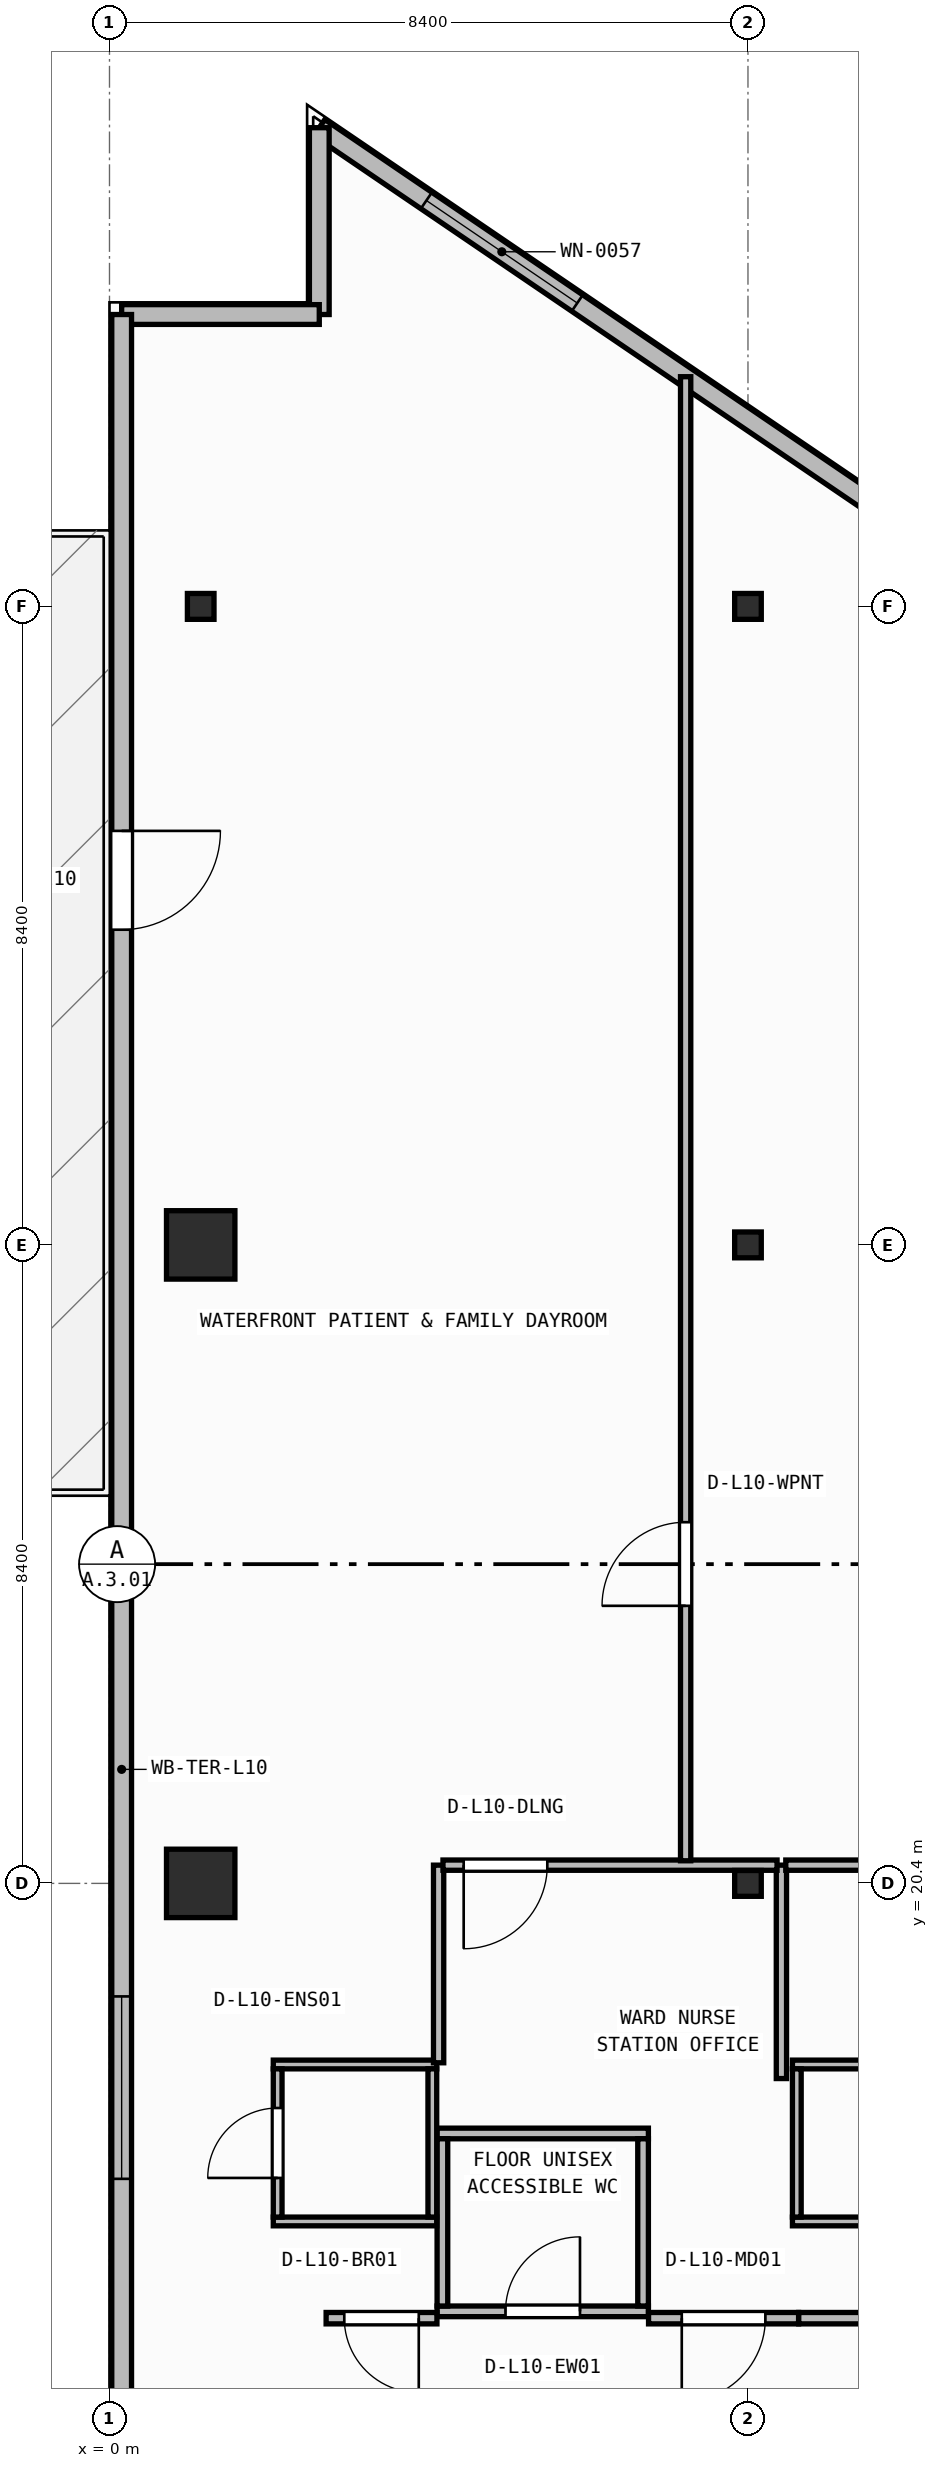
"""IFC4 building model, lengths in metres.
Left out: names, types, materials, properties, quantities, classifications, styles, units other than length and angle.
Written with IfcOpenShell. Run it as: python <this file> out.ifc"""

import sys

from ifc_helpers import new_model, si_unit, direction, frame, frame_2d, origin, origin_2d, place, context, subcontext, project, spatial, rectangle, i_section, extrude, element, fill, save


model = new_model("IFC4")
c1 = context("Model", 3, precision=1e-05, world=origin(), true_north=direction((0.0, 1.0)))
c2 = subcontext(c1, "Body", "Model", "MODEL_VIEW")
j1 = project(units=[si_unit("LENGTHUNIT", "METRE"), si_unit("PLANEANGLEUNIT", "RADIAN")], contexts=[c1])
p1 = place(None, origin())
s1 = spatial("IfcSite", under=j1, at=p1, CompositionType="ELEMENT")
p2 = place(p1, origin())
s2 = spatial("IfcBuilding", under=s1, at=p2, CompositionType="ELEMENT")
p3 = place(p2, frame((0.0, 0.0, 42.25)))
s3 = spatial("IfcBuildingStorey", under=s2, at=p3, CompositionType="ELEMENT", Elevation=42.25)
p4 = place(p3, frame((1.2, 20.4, 0.0), z_axis=(0.0, 0.0, 1.0), x_axis=(1.0, 0.0, 0.0)))
e1 = element("IfcColumn", 1, at=p4, inside=s3, PredefinedType="COLUMN", context=c2, shape_type="SweptSolid", body=[
    extrude(rectangle(XDim=0.9, YDim=0.9, at=origin_2d()), origin(), (0.0, 0.0, 1.0), 3.95),
])
p5 = place(p3, frame((8.4, 20.4, 0.0), z_axis=(0.0, 0.0, 1.0), x_axis=(1.0, 0.0, 0.0)))
e2 = element("IfcColumn", 2, at=p5, inside=s3, PredefinedType="COLUMN", context=c2, shape_type="SweptSolid", body=[
    extrude(i_section(OverallWidth=0.35, OverallDepth=0.34, WebThickness=0.016, FlangeThickness=0.028, at=origin_2d()), origin(), (0.0, 0.0, 1.0), 3.95),
])
p6 = place(p3, frame((1.2, 28.8, 0.0), z_axis=(0.0, 0.0, 1.0), x_axis=(1.0, 0.0, 0.0)))
e3 = element("IfcColumn", 3, at=p6, inside=s3, PredefinedType="COLUMN", context=c2, shape_type="SweptSolid", body=[
    extrude(rectangle(XDim=0.9, YDim=0.9, at=origin_2d()), origin(), (0.0, 0.0, 1.0), 3.95),
])
for number, where, z_axis, x_axis in (
    (4, (8.4, 28.8, 0.0), (0.0, 0.0, 1.0), (1.0, 0.0, 0.0)),
    (5, (1.2, 37.2, 0.0), (0.0, 0.0, 1.0), (1.0, 0.0, 0.0)),
    (6, (8.4, 37.2, 0.0), (0.0, 0.0, 1.0), (1.0, 0.0, 0.0)),
):
    element("IfcColumn", number, at=place(p3, frame(where, z_axis=z_axis, x_axis=x_axis)), inside=s3, PredefinedType="COLUMN", context=c2, shape_type="SweptSolid", body=[
        extrude(i_section(OverallWidth=0.35, OverallDepth=0.34, WebThickness=0.016, FlangeThickness=0.028, at=origin_2d()), origin(), (0.0, 0.0, 1.0), 3.95),
    ])
p7 = place(p3, frame((11.561, 37.517, 0.0), z_axis=(0.0, 0.0, 1.0), x_axis=(-0.827064743936, 0.562106670782, 0.0)))
e7 = element("IfcWall", 7, at=p7, inside=s3, PredefinedType="STANDARD", context=c2, shape_type="SweptSolid", body=[
    extrude(rectangle(XDim=10.641, YDim=0.26, at=frame_2d((5.32, 0.0))), origin(), (0.0, 0.0, 1.0), 3.71),
])
p8 = place(p7, frame((6.537, 0.0, 0.9)))
e8 = element("IfcOpeningElement", 8, at=p8, cuts=e7, PredefinedType="OPENING", context=c2, shape_type="SweptSolid", body=[
    extrude(rectangle(XDim=2.4, YDim=1.65, at=frame_2d((1.2, 0.825))), frame((0.0, 0.14, 0.0), z_axis=(0.0, -1.0, 0.0), x_axis=(1.0, 0.0, 0.0)), (0.0, 0.0, 1.0), 0.28),
])
p9 = place(p3, frame((2.76, 43.498, 0.0), z_axis=(0.0, 0.0, 1.0), x_axis=(0.0, -1.0, 0.0)))
e9 = element("IfcWall", 9, at=p9, inside=s3, PredefinedType="STANDARD", context=c2, shape_type="SweptSolid", body=[
    extrude(rectangle(XDim=2.458, YDim=0.26, at=frame_2d((1.229, 0.0))), origin(), (0.0, 0.0, 1.0), 3.71),
])
p10 = place(p3, frame((2.76, 41.04, 0.0), z_axis=(0.0, 0.0, 1.0), x_axis=(-1.0, 0.0, 0.0)))
e10 = element("IfcWall", 10, at=p10, inside=s3, PredefinedType="STANDARD", context=c2, shape_type="SweptSolid", body=[
    extrude(rectangle(XDim=2.6, YDim=0.26, at=frame_2d((1.3, 0.0))), origin(), (0.0, 0.0, 1.0), 3.71),
])
p11 = place(p3, frame((0.16, 41.04, 0.0), z_axis=(0.0, 0.0, 1.0), x_axis=(0.0, -1.0, 0.0)))
e11 = element("IfcWall", 11, at=p11, inside=s3, PredefinedType="STANDARD", context=c2, shape_type="SweptSolid", body=[
    extrude(rectangle(XDim=38.28, YDim=0.26, at=frame_2d((19.14, 0.0))), origin(), (0.0, 0.0, 1.0), 3.71),
])
p12 = place(p11, frame((6.793, 0.0, 0.0)))
e12 = element("IfcOpeningElement", 12, at=p12, cuts=e11, PredefinedType="OPENING", context=c2, shape_type="SweptSolid", body=[
    extrude(rectangle(XDim=1.3, YDim=2.15, at=frame_2d((0.65, 1.075))), frame((0.0, 0.14, 0.0), z_axis=(0.0, -1.0, 0.0), x_axis=(1.0, 0.0, 0.0)), (0.0, 0.0, 1.0), 0.28),
])
p13 = place(p11, frame((22.127, 0.0, 0.9)))
e13 = element("IfcOpeningElement", 13, at=p13, cuts=e11, PredefinedType="OPENING", context=c2, shape_type="SweptSolid", body=[
    extrude(rectangle(XDim=2.4, YDim=1.65, at=frame_2d((1.2, 0.825))), frame((0.0, 0.14, 0.0), z_axis=(0.0, -1.0, 0.0), x_axis=(1.0, 0.0, 0.0)), (0.0, 0.0, 1.0), 0.28),
])
p14 = place(p3, frame((4.31, 14.77, 0.0), z_axis=(0.0, 0.0, 1.0), x_axis=(1.0, 0.0, 0.0)))
e14 = element("IfcWall", 14, at=p14, inside=s3, PredefinedType="PARTITIONING", context=c2, shape_type="SweptSolid", body=[
    extrude(rectangle(XDim=2.78, YDim=0.14, at=frame_2d((1.39, 0.0))), origin(), (0.0, 0.0, 1.0), 3.71),
])
p15 = place(p14, frame((0.9, 0.0, 0.0)))
e15 = element("IfcOpeningElement", 15, at=p15, cuts=e14, PredefinedType="OPENING", context=c2, shape_type="SweptSolid", body=[
    extrude(rectangle(XDim=0.98, YDim=2.1, at=frame_2d((0.49, 1.05))), frame((0.0, 0.08, 0.0), z_axis=(0.0, -1.0, 0.0), x_axis=(1.0, 0.0, 0.0)), (0.0, 0.0, 1.0), 0.16),
])
p16 = place(p3, frame((4.31, 17.11, 0.0), z_axis=(0.0, 0.0, 1.0), x_axis=(1.0, 0.0, 0.0)))
e16 = element("IfcWall", 16, at=p16, inside=s3, PredefinedType="PARTITIONING", context=c2, shape_type="SweptSolid", body=[
    extrude(rectangle(XDim=2.78, YDim=0.14, at=frame_2d((1.39, 0.0))), origin(), (0.0, 0.0, 1.0), 3.71),
])
for number, where, z_axis, x_axis in (
    (17, (4.38, 14.84, 0.0), (0.0, 0.0, 1.0), (0.0, 1.0, 0.0)),
    (18, (7.02, 14.84, 0.0), (0.0, 0.0, 1.0), (0.0, 1.0, 0.0)),
):
    element("IfcWall", number, at=place(p3, frame(where, z_axis=z_axis, x_axis=x_axis)), inside=s3, PredefinedType="PARTITIONING", context=c2, shape_type="SweptSolid", body=[
        extrude(rectangle(XDim=2.2, YDim=0.14, at=frame_2d((1.1, 0.0))), origin(), (0.0, 0.0, 1.0), 3.71),
    ])
for number, where, z_axis, x_axis in (
    (19, (2.155, 15.952, 0.0), (0.0, 0.0, 1.0), (1.0, 0.0, 0.0)),
    (20, (2.155, 18.018, 0.0), (0.0, 0.0, 1.0), (1.0, 0.0, 0.0)),
):
    element("IfcWall", number, at=place(p3, frame(where, z_axis=z_axis, x_axis=x_axis)), inside=s3, PredefinedType="PARTITIONING", context=c2, shape_type="SweptSolid", body=[
        extrude(rectangle(XDim=2.15, YDim=0.115, at=frame_2d((1.075, 0.0))), origin(), (0.0, 0.0, 1.0), 3.71),
    ])
p17 = place(p3, frame((2.212, 16.01, 0.0), z_axis=(0.0, 0.0, 1.0), x_axis=(0.0, 1.0, 0.0)))
e21 = element("IfcWall", 21, at=p17, inside=s3, PredefinedType="PARTITIONING", context=c2, shape_type="SweptSolid", body=[
    extrude(rectangle(XDim=1.95, YDim=0.115, at=frame_2d((0.975, 0.0))), origin(), (0.0, 0.0, 1.0), 3.71),
])
p18 = place(p17, frame((0.515, 0.0, 0.0)))
e22 = element("IfcOpeningElement", 22, at=p18, cuts=e21, PredefinedType="OPENING", context=c2, shape_type="SweptSolid", body=[
    extrude(rectangle(XDim=0.92, YDim=2.1, at=frame_2d((0.46, 1.05))), frame((0.0, 0.067, 0.0), z_axis=(0.0, -1.0, 0.0), x_axis=(1.0, 0.0, 0.0)), (0.0, 0.0, 1.0), 0.135),
])
p19 = place(p3, frame((4.248, 16.01, 0.0), z_axis=(0.0, 0.0, 1.0), x_axis=(0.0, 1.0, 0.0)))
e23 = element("IfcWall", 23, at=p19, inside=s3, PredefinedType="PARTITIONING", context=c2, shape_type="SweptSolid", body=[
    extrude(rectangle(XDim=1.95, YDim=0.115, at=frame_2d((0.975, 0.0))), origin(), (0.0, 0.0, 1.0), 3.71),
])
for number, where, z_axis, x_axis in (
    (24, (8.985, 15.952, 0.0), (0.0, 0.0, 1.0), (1.0, 0.0, 0.0)),
    (25, (8.985, 18.018, 0.0), (0.0, 0.0, 1.0), (1.0, 0.0, 0.0)),
):
    element("IfcWall", number, at=place(p3, frame(where, z_axis=z_axis, x_axis=x_axis)), inside=s3, PredefinedType="PARTITIONING", context=c2, shape_type="SweptSolid", body=[
        extrude(rectangle(XDim=2.15, YDim=0.115, at=frame_2d((1.075, 0.0))), origin(), (0.0, 0.0, 1.0), 3.71),
    ])
p20 = place(p3, frame((9.042, 16.01, 0.0), z_axis=(0.0, 0.0, 1.0), x_axis=(0.0, 1.0, 0.0)))
e26 = element("IfcWall", 26, at=p20, inside=s3, PredefinedType="PARTITIONING", context=c2, shape_type="SweptSolid", body=[
    extrude(rectangle(XDim=1.95, YDim=0.115, at=frame_2d((0.975, 0.0))), origin(), (0.0, 0.0, 1.0), 3.71),
])
p21 = place(p3, frame((4.308, 14.68, 0.0), z_axis=(0.0, 0.0, 1.0), x_axis=(-1.0, 0.0, 0.0)))
e27 = element("IfcWall", 27, at=p21, inside=s3, PredefinedType="PARTITIONING", context=c2, shape_type="SweptSolid", body=[
    extrude(rectangle(XDim=1.458, YDim=0.15, at=frame_2d((0.729, 0.0))), origin(), (0.0, 0.0, 1.0), 3.71),
])
p22 = place(p21, frame((0.239, 0.0, 0.0)))
e28 = element("IfcOpeningElement", 28, at=p22, cuts=e27, PredefinedType="OPENING", context=c2, shape_type="SweptSolid", body=[
    extrude(rectangle(XDim=0.98, YDim=2.1, at=frame_2d((0.49, 1.05))), frame((0.0, 0.085, 0.0), z_axis=(0.0, -1.0, 0.0), x_axis=(1.0, 0.0, 0.0)), (0.0, 0.0, 1.0), 0.17),
])
p23 = place(p3, frame((9.066, 14.68, 0.0), z_axis=(0.0, 0.0, 1.0), x_axis=(-1.0, 0.0, 0.0)))
e29 = element("IfcWall", 29, at=p23, inside=s3, PredefinedType="PARTITIONING", context=c2, shape_type="SweptSolid", body=[
    extrude(rectangle(XDim=1.974, YDim=0.15, at=frame_2d((0.987, 0.0))), origin(), (0.0, 0.0, 1.0), 3.71),
])
p24 = place(p23, frame((0.437, 0.0, 0.0)))
e30 = element("IfcOpeningElement", 30, at=p24, cuts=e29, PredefinedType="OPENING", context=c2, shape_type="SweptSolid", body=[
    extrude(rectangle(XDim=1.1, YDim=2.1, at=frame_2d((0.55, 1.05))), frame((0.0, 0.085, 0.0), z_axis=(0.0, -1.0, 0.0), x_axis=(1.0, 0.0, 0.0)), (0.0, 0.0, 1.0), 0.17),
])
p25 = place(p3, frame((13.936, 14.68, 0.0), z_axis=(0.0, 0.0, 1.0), x_axis=(-1.0, 0.0, 0.0)))
e31 = element("IfcWall", 31, at=p25, inside=s3, PredefinedType="PARTITIONING", context=c2, shape_type="SweptSolid", body=[
    extrude(rectangle(XDim=4.868, YDim=0.15, at=frame_2d((2.434, 0.0))), origin(), (0.0, 0.0, 1.0), 3.71),
])
p26 = place(p25, frame((1.784, 0.0, 0.0)))
e32 = element("IfcOpeningElement", 32, at=p26, cuts=e31, PredefinedType="OPENING", context=c2, shape_type="SweptSolid", body=[
    extrude(rectangle(XDim=1.3, YDim=2.15, at=frame_2d((0.65, 1.075))), frame((0.0, 0.085, 0.0), z_axis=(0.0, -1.0, 0.0), x_axis=(1.0, 0.0, 0.0)), (0.0, 0.0, 1.0), 0.17),
])
p27 = place(p3, frame((4.33, 18.04, 0.0), z_axis=(0.0, 0.0, 1.0), x_axis=(0.0, 1.0, 0.0)))
e33 = element("IfcWall", 33, at=p27, inside=s3, PredefinedType="PARTITIONING", context=c2, shape_type="SweptSolid", body=[
    extrude(rectangle(XDim=2.6, YDim=0.135, at=frame_2d((1.3, 0.0))), origin(), (0.0, 0.0, 1.0), 3.71),
])
p28 = place(p3, frame((8.84, 17.833, 0.0), z_axis=(0.0, 0.0, 1.0), x_axis=(0.0, 1.0, 0.0)))
e34 = element("IfcWall", 34, at=p28, inside=s3, PredefinedType="PARTITIONING", context=c2, shape_type="SweptSolid", body=[
    extrude(rectangle(XDim=2.807, YDim=0.135, at=frame_2d((1.404, 0.0))), origin(), (0.0, 0.0, 1.0), 3.71),
])
p29 = place(p3, frame((8.782, 20.64, 0.0), z_axis=(0.0, 0.0, 1.0), x_axis=(-1.0, 0.0, 0.0)))
e35 = element("IfcWall", 35, at=p29, inside=s3, PredefinedType="PARTITIONING", context=c2, shape_type="SweptSolid", body=[
    extrude(rectangle(XDim=4.395, YDim=0.135, at=frame_2d((2.198, 0.0))), origin(), (0.0, 0.0, 1.0), 3.073),
])
p30 = place(p29, frame((3.023, 0.0, 0.0)))
e36 = element("IfcOpeningElement", 36, at=p30, cuts=e35, PredefinedType="OPENING", context=c2, shape_type="SweptSolid", body=[
    extrude(rectangle(XDim=1.1, YDim=2.1, at=frame_2d((0.55, 1.05))), frame((0.0, 0.077, 0.0), z_axis=(0.0, -1.0, 0.0), x_axis=(1.0, 0.0, 0.0)), (0.0, 0.0, 1.0), 0.155),
])
p31 = place(p3, frame((13.71, 20.64, 0.0), z_axis=(0.0, 0.0, 1.0), x_axis=(-1.0, 0.0, 0.0)))
e37 = element("IfcWall", 37, at=p31, inside=s3, PredefinedType="PARTITIONING", context=c2, shape_type="SweptSolid", body=[
    extrude(rectangle(XDim=4.812, YDim=0.135, at=frame_2d((2.406, 0.0))), origin(), (0.0, 0.0, 1.0), 3.073),
])
p32 = place(p3, frame((7.58, 20.698, 0.0), z_axis=(0.0, 0.0, 1.0), x_axis=(0.0, 1.0, 0.0)))
e38 = element("IfcWall", 38, at=p32, inside=s3, PredefinedType="PARTITIONING", context=c2, shape_type="SweptSolid", body=[
    extrude(rectangle(XDim=19.524, YDim=0.135, at=frame_2d((9.762, 0.0))), origin(), (0.0, 0.0, 1.0), 3.71),
])
p33 = place(p32, frame((3.354, 0.0, 0.0)))
e39 = element("IfcOpeningElement", 39, at=p33, cuts=e38, PredefinedType="OPENING", context=c2, shape_type="SweptSolid", body=[
    extrude(rectangle(XDim=1.1, YDim=2.1, at=frame_2d((0.55, 1.05))), frame((0.0, 0.077, 0.0), z_axis=(0.0, -1.0, 0.0), x_axis=(1.0, 0.0, 0.0)), (0.0, 0.0, 1.0), 0.155),
])
p34 = place(p8, origin())
e40 = element("IfcWindow", 40, at=p34, inside=s3, PartitioningType="SINGLE_PANEL", PredefinedType="WINDOW", context=c2, shape_type="SweptSolid", body=[
    extrude(rectangle(XDim=2.4, YDim=1.65, at=frame_2d((1.2, 0.825))), frame((0.0, 0.03, 0.0), z_axis=(0.0, -1.0, 0.0), x_axis=(1.0, 0.0, 0.0)), (0.0, 0.0, 1.0), 0.06),
])
fill(e8, e40)
p35 = place(p12, origin())
e41 = element("IfcDoor", 41, at=p35, inside=s3, OperationType="SINGLE_SWING_LEFT", PredefinedType="DOOR", context=c2, shape_type="SweptSolid", body=[
    extrude(rectangle(XDim=1.3, YDim=2.15, at=frame_2d((0.65, 1.075))), frame((0.0, 0.025, 0.0), z_axis=(0.0, -1.0, 0.0), x_axis=(1.0, 0.0, 0.0)), (0.0, 0.0, 1.0), 0.05),
])
fill(e12, e41)
p36 = place(p15, origin())
e42 = element("IfcDoor", 42, at=p36, inside=s3, OperationType="SINGLE_SWING_RIGHT", PredefinedType="DOOR", context=c2, shape_type="SweptSolid", body=[
    extrude(rectangle(XDim=0.98, YDim=2.1, at=frame_2d((0.49, 1.05))), frame((0.0, 0.025, 0.0), z_axis=(0.0, -1.0, 0.0), x_axis=(1.0, 0.0, 0.0)), (0.0, 0.0, 1.0), 0.05),
])
fill(e15, e42)
p37 = place(p18, origin())
e43 = element("IfcDoor", 43, at=p37, inside=s3, OperationType="SINGLE_SWING_LEFT", PredefinedType="DOOR", context=c2, shape_type="SweptSolid", body=[
    extrude(rectangle(XDim=0.92, YDim=2.1, at=frame_2d((0.46, 1.05))), frame((0.0, 0.025, 0.0), z_axis=(0.0, -1.0, 0.0), x_axis=(1.0, 0.0, 0.0)), (0.0, 0.0, 1.0), 0.05),
])
fill(e22, e43)
p38 = place(p22, origin())
e44 = element("IfcDoor", 44, at=p38, inside=s3, OperationType="SINGLE_SWING_LEFT", PredefinedType="DOOR", context=c2, shape_type="SweptSolid", body=[
    extrude(rectangle(XDim=0.98, YDim=2.1, at=frame_2d((0.49, 1.05))), frame((0.0, 0.025, 0.0), z_axis=(0.0, -1.0, 0.0), x_axis=(1.0, 0.0, 0.0)), (0.0, 0.0, 1.0), 0.05),
])
fill(e28, e44)
p39 = place(p24, origin())
e45 = element("IfcDoor", 45, at=p39, inside=s3, OperationType="SINGLE_SWING_RIGHT", PredefinedType="DOOR", context=c2, shape_type="SweptSolid", body=[
    extrude(rectangle(XDim=1.1, YDim=2.1, at=frame_2d((0.55, 1.05))), frame((0.0, 0.025, 0.0), z_axis=(0.0, -1.0, 0.0), x_axis=(1.0, 0.0, 0.0)), (0.0, 0.0, 1.0), 0.05),
])
fill(e30, e45)
p40 = place(p30, origin())
e46 = element("IfcDoor", 46, at=p40, inside=s3, OperationType="SINGLE_SWING_RIGHT", PredefinedType="DOOR", context=c2, shape_type="SweptSolid", body=[
    extrude(rectangle(XDim=1.1, YDim=2.1, at=frame_2d((0.55, 1.05))), frame((0.0, 0.025, 0.0), z_axis=(0.0, -1.0, 0.0), x_axis=(1.0, 0.0, 0.0)), (0.0, 0.0, 1.0), 0.05),
])
fill(e36, e46)
p41 = place(p33, origin())
e47 = element("IfcDoor", 47, at=p41, inside=s3, OperationType="SINGLE_SWING_LEFT", PredefinedType="DOOR", context=c2, shape_type="SweptSolid", body=[
    extrude(rectangle(XDim=1.1, YDim=2.1, at=frame_2d((0.55, 1.05))), frame((0.0, 0.025, 0.0), z_axis=(0.0, -1.0, 0.0), x_axis=(1.0, 0.0, 0.0)), (0.0, 0.0, 1.0), 0.05),
])
fill(e39, e47)
p42 = place(p13, origin())
e48 = element("IfcWindow", 48, at=p42, inside=s3, PartitioningType="SINGLE_PANEL", PredefinedType="WINDOW", context=c2, shape_type="SweptSolid", body=[
    extrude(rectangle(XDim=2.4, YDim=1.65, at=frame_2d((1.2, 0.825))), frame((0.0, 0.03, 0.0), z_axis=(0.0, -1.0, 0.0), x_axis=(1.0, 0.0, 0.0)), (0.0, 0.0, 1.0), 0.06),
])
fill(e13, e48)
save(model, sys.argv[1])
